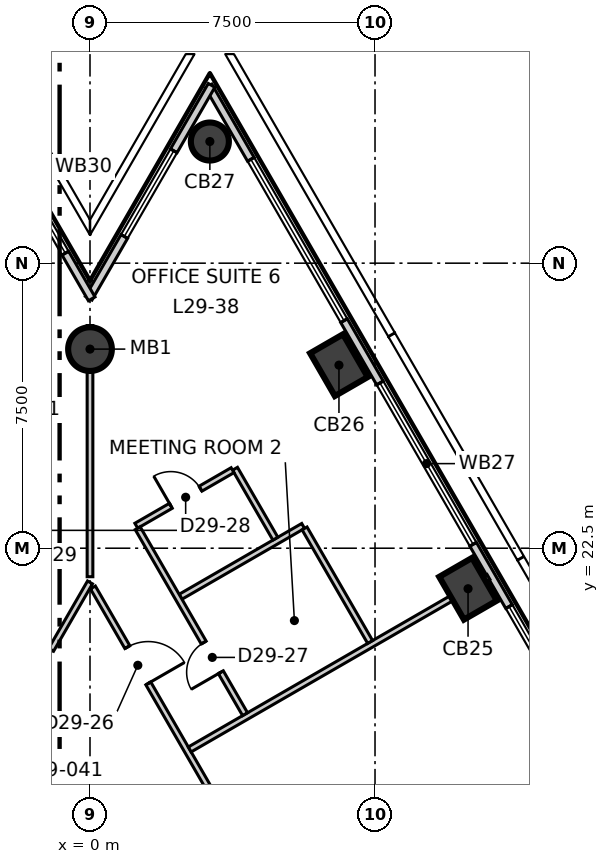
"""IFC4 building model, lengths in metres.
Left out: names, types, materials, properties, quantities, classifications, styles, units other than length and angle.
Written with IfcOpenShell. Run it as: python <this file> out.ifc"""

import sys

from ifc_helpers import new_model, si_unit, direction, frame, frame_2d, origin, origin_2d, place, context, subcontext, project, spatial, rectangle, circle, extrude, element, fill, save


model = new_model("IFC4")
c1 = context("Model", 3, precision=1e-05, world=origin(), true_north=direction((0.0, 1.0)))
c2 = subcontext(c1, "Body", "Model", "MODEL_VIEW")
j1 = project(units=[si_unit("LENGTHUNIT", "METRE"), si_unit("PLANEANGLEUNIT", "RADIAN")], contexts=[c1])
p1 = place(None, origin())
s1 = spatial("IfcSite", under=j1, at=p1, CompositionType="ELEMENT")
p2 = place(p1, origin())
s2 = spatial("IfcBuilding", under=s1, at=p2, CompositionType="ELEMENT")
p3 = place(p2, frame((0.0, 0.0, 128.3)))
s3 = spatial("IfcBuildingStorey", under=s2, at=p3, CompositionType="ELEMENT", Elevation=128.3)
for number, where, z_axis, x_axis in (
    (1, (9.948, 21.434, -0.3), (0.0, 0.0, 1.0), (-0.5, 0.866, 0.0)),
    (2, (6.551, 27.317, -0.3), (0.0, 0.0, 1.0), (-0.5, 0.866, 0.0)),
):
    element("IfcColumn", number, at=place(p3, frame(where, z_axis=z_axis, x_axis=x_axis)), inside=s3, PredefinedType="COLUMN", context=c2, shape_type="SweptSolid", body=[
        extrude(rectangle(XDim=1.3, YDim=1.0, at=origin_2d()), origin(), (0.0, 0.0, 1.0), 4.0),
    ])
p4 = place(p3, frame((3.154, 33.201, -0.3), z_axis=(0.0, 0.0, 1.0), x_axis=(-0.5, 0.866025403784, 0.0)))
e3 = element("IfcColumn", 3, at=p4, inside=s3, PredefinedType="COLUMN", context=c2, shape_type="SweptSolid", body=[
    extrude(circle(Radius=0.5, at=origin_2d()), origin(), (0.0, 0.0, 1.0), 4.0),
])
p5 = place(p3, frame((0.0, 27.739, -0.3), z_axis=(0.0, 0.0, 1.0), x_axis=(1.0, 0.0, 0.0)))
e4 = element("IfcColumn", 4, at=p5, inside=s3, PredefinedType="COLUMN", context=c2, shape_type="SweptSolid", body=[
    extrude(circle(Radius=0.575, at=origin_2d()), origin(), (0.0, 0.0, 1.0), 4.0),
])
p6 = place(p3, frame((31.588, -14.647, 0.0), z_axis=(0.0, 0.0, 1.0), x_axis=(-0.500005036527, 0.866022495925, 0.0)))
e5 = element("IfcWall", 5, at=p6, inside=s3, PredefinedType="ELEMENTEDWALL", context=c2, shape_type="SweptSolid", body=[
    extrude(rectangle(XDim=56.938, YDim=0.2, at=frame_2d((28.469, 0.0))), origin(), (0.0, 0.0, 1.0), 3.7),
])
p7 = place(p6, frame((2.25, 0.0, 0.9)))
e6 = element("IfcOpeningElement", 6, at=p7, cuts=e5, PredefinedType="OPENING", context=c2, shape_type="SweptSolid", body=[
    extrude(rectangle(XDim=4.9, YDim=2.5, at=frame_2d((2.45, 1.25))), frame((0.0, 0.11, 0.0), z_axis=(0.0, -1.0, 0.0), x_axis=(1.0, 0.0, 0.0)), (0.0, 0.0, 1.0), 0.22),
])
p8 = place(p6, frame((9.044, 0.0, 0.9)))
e7 = element("IfcOpeningElement", 7, at=p8, cuts=e5, PredefinedType="OPENING", context=c2, shape_type="SweptSolid", body=[
    extrude(rectangle(XDim=4.9, YDim=2.5, at=frame_2d((2.45, 1.25))), frame((0.0, 0.11, 0.0), z_axis=(0.0, -1.0, 0.0), x_axis=(1.0, 0.0, 0.0)), (0.0, 0.0, 1.0), 0.22),
])
p9 = place(p6, frame((15.838, 0.0, 0.9)))
e8 = element("IfcOpeningElement", 8, at=p9, cuts=e5, PredefinedType="OPENING", context=c2, shape_type="SweptSolid", body=[
    extrude(rectangle(XDim=4.9, YDim=2.5, at=frame_2d((2.45, 1.25))), frame((0.0, 0.11, 0.0), z_axis=(0.0, -1.0, 0.0), x_axis=(1.0, 0.0, 0.0)), (0.0, 0.0, 1.0), 0.22),
])
p10 = place(p6, frame((22.632, 0.0, 0.9)))
e9 = element("IfcOpeningElement", 9, at=p10, cuts=e5, PredefinedType="OPENING", context=c2, shape_type="SweptSolid", body=[
    extrude(rectangle(XDim=4.9, YDim=2.5, at=frame_2d((2.45, 1.25))), frame((0.0, 0.11, 0.0), z_axis=(0.0, -1.0, 0.0), x_axis=(1.0, 0.0, 0.0)), (0.0, 0.0, 1.0), 0.22),
])
p11 = place(p6, frame((29.426, 0.0, 0.9)))
e10 = element("IfcOpeningElement", 10, at=p11, cuts=e5, PredefinedType="OPENING", context=c2, shape_type="SweptSolid", body=[
    extrude(rectangle(XDim=4.9, YDim=2.5, at=frame_2d((2.45, 1.25))), frame((0.0, 0.11, 0.0), z_axis=(0.0, -1.0, 0.0), x_axis=(1.0, 0.0, 0.0)), (0.0, 0.0, 1.0), 0.22),
])
p12 = place(p6, frame((36.22, 0.0, 0.9)))
e11 = element("IfcOpeningElement", 11, at=p12, cuts=e5, PredefinedType="OPENING", context=c2, shape_type="SweptSolid", body=[
    extrude(rectangle(XDim=4.9, YDim=2.5, at=frame_2d((2.45, 1.25))), frame((0.0, 0.11, 0.0), z_axis=(0.0, -1.0, 0.0), x_axis=(1.0, 0.0, 0.0)), (0.0, 0.0, 1.0), 0.22),
])
p13 = place(p6, frame((43.014, 0.0, 0.9)))
e12 = element("IfcOpeningElement", 12, at=p13, cuts=e5, PredefinedType="OPENING", context=c2, shape_type="SweptSolid", body=[
    extrude(rectangle(XDim=4.9, YDim=2.5, at=frame_2d((2.45, 1.25))), frame((0.0, 0.11, 0.0), z_axis=(0.0, -1.0, 0.0), x_axis=(1.0, 0.0, 0.0)), (0.0, 0.0, 1.0), 0.22),
])
p14 = place(p6, frame((49.808, 0.0, 0.9)))
e13 = element("IfcOpeningElement", 13, at=p14, cuts=e5, PredefinedType="OPENING", context=c2, shape_type="SweptSolid", body=[
    extrude(rectangle(XDim=4.9, YDim=2.5, at=frame_2d((2.45, 1.25))), frame((0.0, 0.11, 0.0), z_axis=(0.0, -1.0, 0.0), x_axis=(1.0, 0.0, 0.0)), (0.0, 0.0, 1.0), 0.22),
])
p15 = place(p3, frame((3.199, 34.679, 0.0), z_axis=(0.0, 0.0, 1.0), x_axis=(-0.500012177251, -0.866018373131, 0.0)))
e14 = element("IfcWall", 14, at=p15, inside=s3, PredefinedType="ELEMENTEDWALL", context=c2, shape_type="SweptSolid", body=[
    extrude(rectangle(XDim=6.468, YDim=0.2, at=frame_2d((3.234, 0.0))), origin(), (0.0, 0.0, 1.0), 3.7),
])
p16 = place(p15, frame((1.99, 0.0, 0.9)))
e15 = element("IfcOpeningElement", 15, at=p16, cuts=e14, PredefinedType="OPENING", context=c2, shape_type="SweptSolid", body=[
    extrude(rectangle(XDim=2.6, YDim=2.5, at=frame_2d((1.3, 1.25))), frame((0.0, 0.11, 0.0), z_axis=(0.0, -1.0, 0.0), x_axis=(1.0, 0.0, 0.0)), (0.0, 0.0, 1.0), 0.22),
])
p17 = place(p3, frame((0.045, 29.061, 0.0), z_axis=(0.0, 0.0, 1.0), x_axis=(-0.500012177251, 0.866018373131, 0.0)))
e16 = element("IfcWall", 16, at=p17, inside=s3, PredefinedType="ELEMENTEDWALL", context=c2, shape_type="SweptSolid", body=[
    extrude(rectangle(XDim=6.468, YDim=0.2, at=frame_2d((3.234, 0.0))), origin(), (0.0, 0.0, 1.0), 3.7),
])
p18 = place(p17, frame((1.39, 0.0, 0.9)))
e17 = element("IfcOpeningElement", 17, at=p18, cuts=e16, PredefinedType="OPENING", context=c2, shape_type="SweptSolid", body=[
    extrude(rectangle(XDim=2.6, YDim=2.5, at=frame_2d((1.3, 1.25))), frame((0.0, 0.11, 0.0), z_axis=(0.0, -1.0, 0.0), x_axis=(1.0, 0.0, 0.0)), (0.0, 0.0, 1.0), 0.22),
])
p19 = place(p3, frame((-8.903, 6.18, 0.0), z_axis=(0.0, 0.0, 1.0), x_axis=(0.500010074151, 0.866019587393, 0.0)))
e18 = element("IfcWall", 18, at=p19, inside=s3, PredefinedType="PARTITIONING", context=c2, shape_type="SweptSolid", body=[
    extrude(rectangle(XDim=17.806, YDim=0.15, at=frame_2d((8.903, 0.0))), origin(), (0.0, 0.0, 1.0), 3.7),
])
p20 = place(p19, frame((14.756, 0.0, 0.0)))
e19 = element("IfcOpeningElement", 19, at=p20, cuts=e18, PredefinedType="OPENING", context=c2, shape_type="SweptSolid", body=[
    extrude(rectangle(XDim=1.0, YDim=2.1, at=frame_2d((0.5, 1.05))), frame((0.0, 0.085, 0.0), z_axis=(0.0, -1.0, 0.0), x_axis=(1.0, 0.0, 0.0)), (0.0, 0.0, 1.0), 0.17),
])
p21 = place(p19, frame((2.838, 0.0, 0.0)))
e20 = element("IfcOpeningElement", 20, at=p21, cuts=e18, PredefinedType="OPENING", context=c2, shape_type="SweptSolid", body=[
    extrude(rectangle(XDim=1.1, YDim=2.1, at=frame_2d((0.55, 1.05))), frame((0.0, 0.085, 0.0), z_axis=(0.0, -1.0, 0.0), x_axis=(1.0, 0.0, 0.0)), (0.0, 0.0, 1.0), 0.17),
])
p22 = place(p19, frame((10.438, 0.0, 0.0)))
e21 = element("IfcOpeningElement", 21, at=p22, cuts=e18, PredefinedType="OPENING", context=c2, shape_type="SweptSolid", body=[
    extrude(rectangle(XDim=0.9, YDim=2.1, at=frame_2d((0.45, 1.05))), frame((0.0, 0.085, 0.0), z_axis=(0.0, -1.0, 0.0), x_axis=(1.0, 0.0, 0.0)), (0.0, 0.0, 1.0), 0.17),
])
p23 = place(p19, frame((7.438, 0.0, 0.0)))
e22 = element("IfcOpeningElement", 22, at=p23, cuts=e18, PredefinedType="OPENING", context=c2, shape_type="SweptSolid", body=[
    extrude(rectangle(XDim=0.9, YDim=2.1, at=frame_2d((0.45, 1.05))), frame((0.0, 0.085, 0.0), z_axis=(0.0, -1.0, 0.0), x_axis=(1.0, 0.0, 0.0)), (0.0, 0.0, 1.0), 0.17),
])
p24 = place(p3, frame((0.0, 21.75, 0.0), z_axis=(0.0, 0.0, 1.0), x_axis=(0.0, 1.0, 0.0)))
e23 = element("IfcWall", 23, at=p24, inside=s3, PredefinedType="PARTITIONING", context=c2, shape_type="SweptSolid", body=[
    extrude(rectangle(XDim=6.609, YDim=0.15, at=frame_2d((3.304, 0.0))), origin(), (0.0, 0.0, 1.0), 3.15),
])
p25 = place(p3, frame((0.076, 21.468, 0.0), z_axis=(0.0, 0.0, 1.0), x_axis=(0.50001203818, -0.866018453426, 0.0)))
e24 = element("IfcWall", 24, at=p25, inside=s3, PredefinedType="PARTITIONING", context=c2, shape_type="SweptSolid", body=[
    extrude(rectangle(XDim=24.448, YDim=0.15, at=frame_2d((12.224, 0.0))), origin(), (0.0, 0.0, 1.0), 3.7),
])
p26 = place(p25, frame((9.798, 0.0, 0.0)))
e25 = element("IfcOpeningElement", 25, at=p26, cuts=e24, PredefinedType="OPENING", context=c2, shape_type="SweptSolid", body=[
    extrude(rectangle(XDim=1.1, YDim=2.1, at=frame_2d((0.55, 1.05))), frame((0.0, 0.085, 0.0), z_axis=(0.0, -1.0, 0.0), x_axis=(1.0, 0.0, 0.0)), (0.0, 0.0, 1.0), 0.17),
])
p27 = place(p25, frame((19.198, 0.0, 0.0)))
e26 = element("IfcOpeningElement", 26, at=p27, cuts=e24, PredefinedType="OPENING", context=c2, shape_type="SweptSolid", body=[
    extrude(rectangle(XDim=0.9, YDim=2.1, at=frame_2d((0.45, 1.05))), frame((0.0, 0.085, 0.0), z_axis=(0.0, -1.0, 0.0), x_axis=(1.0, 0.0, 0.0)), (0.0, 0.0, 1.0), 0.17),
])
p28 = place(p25, frame((16.398, 0.0, 0.0)))
e27 = element("IfcOpeningElement", 27, at=p28, cuts=e24, PredefinedType="OPENING", context=c2, shape_type="SweptSolid", body=[
    extrude(rectangle(XDim=1.0, YDim=2.1, at=frame_2d((0.5, 1.05))), frame((0.0, 0.085, 0.0), z_axis=(0.0, -1.0, 0.0), x_axis=(1.0, 0.0, 0.0)), (0.0, 0.0, 1.0), 0.17),
])
p29 = place(p25, frame((1.815, 0.0, 0.0)))
e28 = element("IfcOpeningElement", 28, at=p29, cuts=e24, PredefinedType="OPENING", context=c2, shape_type="SweptSolid", body=[
    extrude(rectangle(XDim=1.1, YDim=2.1, at=frame_2d((0.55, 1.05))), frame((0.0, 0.085, 0.0), z_axis=(0.0, -1.0, 0.0), x_axis=(1.0, 0.0, 0.0)), (0.0, 0.0, 1.0), 0.17),
])
p30 = place(p3, frame((2.624, 17.205, 0.0), z_axis=(0.0, 0.0, 1.0), x_axis=(0.866014937375, 0.500018127915, 0.0)))
e29 = element("IfcWall", 29, at=p30, inside=s3, PredefinedType="PARTITIONING", context=c2, shape_type="SweptSolid", body=[
    extrude(rectangle(XDim=9.077, YDim=0.15, at=frame_2d((4.539, 0.0))), origin(), (0.0, 0.0, 1.0), 3.7),
])
p31 = place(p3, frame((2.383, 21.223, 0.0), z_axis=(0.0, 0.0, 1.0), x_axis=(0.865955274182, 0.500121448367, 0.0)))
e30 = element("IfcWall", 30, at=p31, inside=s3, PredefinedType="PARTITIONING", context=c2, shape_type="SweptSolid", body=[
    extrude(rectangle(XDim=3.725, YDim=0.15, at=frame_2d((1.863, 0.0))), origin(), (0.0, 0.0, 1.0), 3.7),
])
p32 = place(p3, frame((5.646, 23.021, 0.0), z_axis=(0.0, 0.0, 1.0), x_axis=(0.49998991961, -0.866031223622, 0.0)))
e31 = element("IfcWall", 31, at=p32, inside=s3, PredefinedType="PARTITIONING", context=c2, shape_type="SweptSolid", body=[
    extrude(rectangle(XDim=3.45, YDim=0.15, at=frame_2d((1.725, 0.0))), origin(), (0.0, 0.0, 1.0), 3.7),
])
p33 = place(p3, frame((3.816, 24.591, 0.0), z_axis=(0.0, 0.0, 1.0), x_axis=(0.499871667208, -0.86609948408, 0.0)))
e32 = element("IfcWall", 32, at=p33, inside=s3, PredefinedType="PARTITIONING", context=c2, shape_type="SweptSolid", body=[
    extrude(rectangle(XDim=2.125, YDim=0.15, at=frame_2d((1.062, 0.0))), origin(), (0.0, 0.0, 1.0), 3.7),
])
p34 = place(p3, frame((1.218, 23.091, 0.0), z_axis=(0.0, 0.0, 1.0), x_axis=(0.866098016745, 0.499874209568, 0.0)))
e33 = element("IfcWall", 33, at=p34, inside=s3, PredefinedType="PARTITIONING", context=c2, shape_type="SweptSolid", body=[
    extrude(rectangle(XDim=2.925, YDim=0.15, at=frame_2d((1.462, 0.0))), origin(), (0.0, 0.0, 1.0), 3.7),
])
p35 = place(p34, frame((1.05, 0.0, 0.0)))
e34 = element("IfcOpeningElement", 34, at=p35, cuts=e33, PredefinedType="OPENING", context=c2, shape_type="SweptSolid", body=[
    extrude(rectangle(XDim=0.9, YDim=2.1, at=frame_2d((0.45, 1.05))), frame((0.0, 0.085, 0.0), z_axis=(0.0, -1.0, 0.0), x_axis=(1.0, 0.0, 0.0)), (0.0, 0.0, 1.0), 0.17),
])
p36 = place(p3, frame((1.255, 23.026, 0.0), z_axis=(0.0, 0.0, 1.0), x_axis=(0.500042884217, -0.866000643155, 0.0)))
e35 = element("IfcWall", 35, at=p36, inside=s3, PredefinedType="PARTITIONING", context=c2, shape_type="SweptSolid", body=[
    extrude(rectangle(XDim=5.65, YDim=0.15, at=frame_2d((2.825, 0.0))), origin(), (0.0, 0.0, 1.0), 3.7),
])
p37 = place(p36, frame((3.475, 0.0, 0.0)))
e36 = element("IfcOpeningElement", 36, at=p37, cuts=e35, PredefinedType="OPENING", context=c2, shape_type="SweptSolid", body=[
    extrude(rectangle(XDim=0.9, YDim=2.1, at=frame_2d((0.45, 1.05))), frame((0.0, 0.085, 0.0), z_axis=(0.0, -1.0, 0.0), x_axis=(1.0, 0.0, 0.0)), (0.0, 0.0, 1.0), 0.17),
])
p38 = place(p12, origin())
e37 = element("IfcWindow", 37, at=p38, inside=s3, PartitioningType="SINGLE_PANEL", PredefinedType="WINDOW", context=c2, shape_type="SweptSolid", body=[
    extrude(rectangle(XDim=4.9, YDim=2.5, at=frame_2d((2.45, 1.25))), frame((0.0, 0.03, 0.0), z_axis=(0.0, -1.0, 0.0), x_axis=(1.0, 0.0, 0.0)), (0.0, 0.0, 1.0), 0.06),
])
fill(e11, e37)
p39 = place(p13, origin())
e38 = element("IfcWindow", 38, at=p39, inside=s3, PartitioningType="SINGLE_PANEL", PredefinedType="WINDOW", context=c2, shape_type="SweptSolid", body=[
    extrude(rectangle(XDim=4.9, YDim=2.5, at=frame_2d((2.45, 1.25))), frame((0.0, 0.03, 0.0), z_axis=(0.0, -1.0, 0.0), x_axis=(1.0, 0.0, 0.0)), (0.0, 0.0, 1.0), 0.06),
])
fill(e12, e38)
p40 = place(p14, origin())
e39 = element("IfcWindow", 39, at=p40, inside=s3, PartitioningType="SINGLE_PANEL", PredefinedType="WINDOW", context=c2, shape_type="SweptSolid", body=[
    extrude(rectangle(XDim=4.9, YDim=2.5, at=frame_2d((2.45, 1.25))), frame((0.0, 0.03, 0.0), z_axis=(0.0, -1.0, 0.0), x_axis=(1.0, 0.0, 0.0)), (0.0, 0.0, 1.0), 0.06),
])
fill(e13, e39)
p41 = place(p16, origin())
e40 = element("IfcWindow", 40, at=p41, inside=s3, PartitioningType="SINGLE_PANEL", PredefinedType="WINDOW", context=c2, shape_type="SweptSolid", body=[
    extrude(rectangle(XDim=2.6, YDim=2.5, at=frame_2d((1.3, 1.25))), frame((0.0, 0.03, 0.0), z_axis=(0.0, -1.0, 0.0), x_axis=(1.0, 0.0, 0.0)), (0.0, 0.0, 1.0), 0.06),
])
fill(e15, e40)
p42 = place(p18, origin())
e41 = element("IfcWindow", 41, at=p42, inside=s3, PartitioningType="SINGLE_PANEL", PredefinedType="WINDOW", context=c2, shape_type="SweptSolid", body=[
    extrude(rectangle(XDim=2.6, YDim=2.5, at=frame_2d((1.3, 1.25))), frame((0.0, 0.03, 0.0), z_axis=(0.0, -1.0, 0.0), x_axis=(1.0, 0.0, 0.0)), (0.0, 0.0, 1.0), 0.06),
])
fill(e17, e41)
p43 = place(p29, origin())
e42 = element("IfcDoor", 42, at=p43, inside=s3, OperationType="SINGLE_SWING_LEFT", PredefinedType="DOOR", context=c2, shape_type="SweptSolid", body=[
    extrude(rectangle(XDim=1.1, YDim=2.1, at=frame_2d((0.55, 1.05))), frame((0.0, 0.025, 0.0), z_axis=(0.0, -1.0, 0.0), x_axis=(1.0, 0.0, 0.0)), (0.0, 0.0, 1.0), 0.05),
])
fill(e28, e42)
p44 = place(p37, origin())
e43 = element("IfcDoor", 43, at=p44, inside=s3, OperationType="SINGLE_SWING_RIGHT", PredefinedType="DOOR", context=c2, shape_type="SweptSolid", body=[
    extrude(rectangle(XDim=0.9, YDim=2.1, at=frame_2d((0.45, 1.05))), frame((0.0, 0.025, 0.0), z_axis=(0.0, -1.0, 0.0), x_axis=(1.0, 0.0, 0.0)), (0.0, 0.0, 1.0), 0.05),
])
fill(e36, e43)
p45 = place(p35, origin())
e44 = element("IfcDoor", 44, at=p45, inside=s3, OperationType="SINGLE_SWING_RIGHT", PredefinedType="DOOR", context=c2, shape_type="SweptSolid", body=[
    extrude(rectangle(XDim=0.9, YDim=2.1, at=frame_2d((0.45, 1.05))), frame((0.0, 0.025, 0.0), z_axis=(0.0, -1.0, 0.0), x_axis=(1.0, 0.0, 0.0)), (0.0, 0.0, 1.0), 0.05),
])
fill(e34, e44)
save(model, sys.argv[1])
